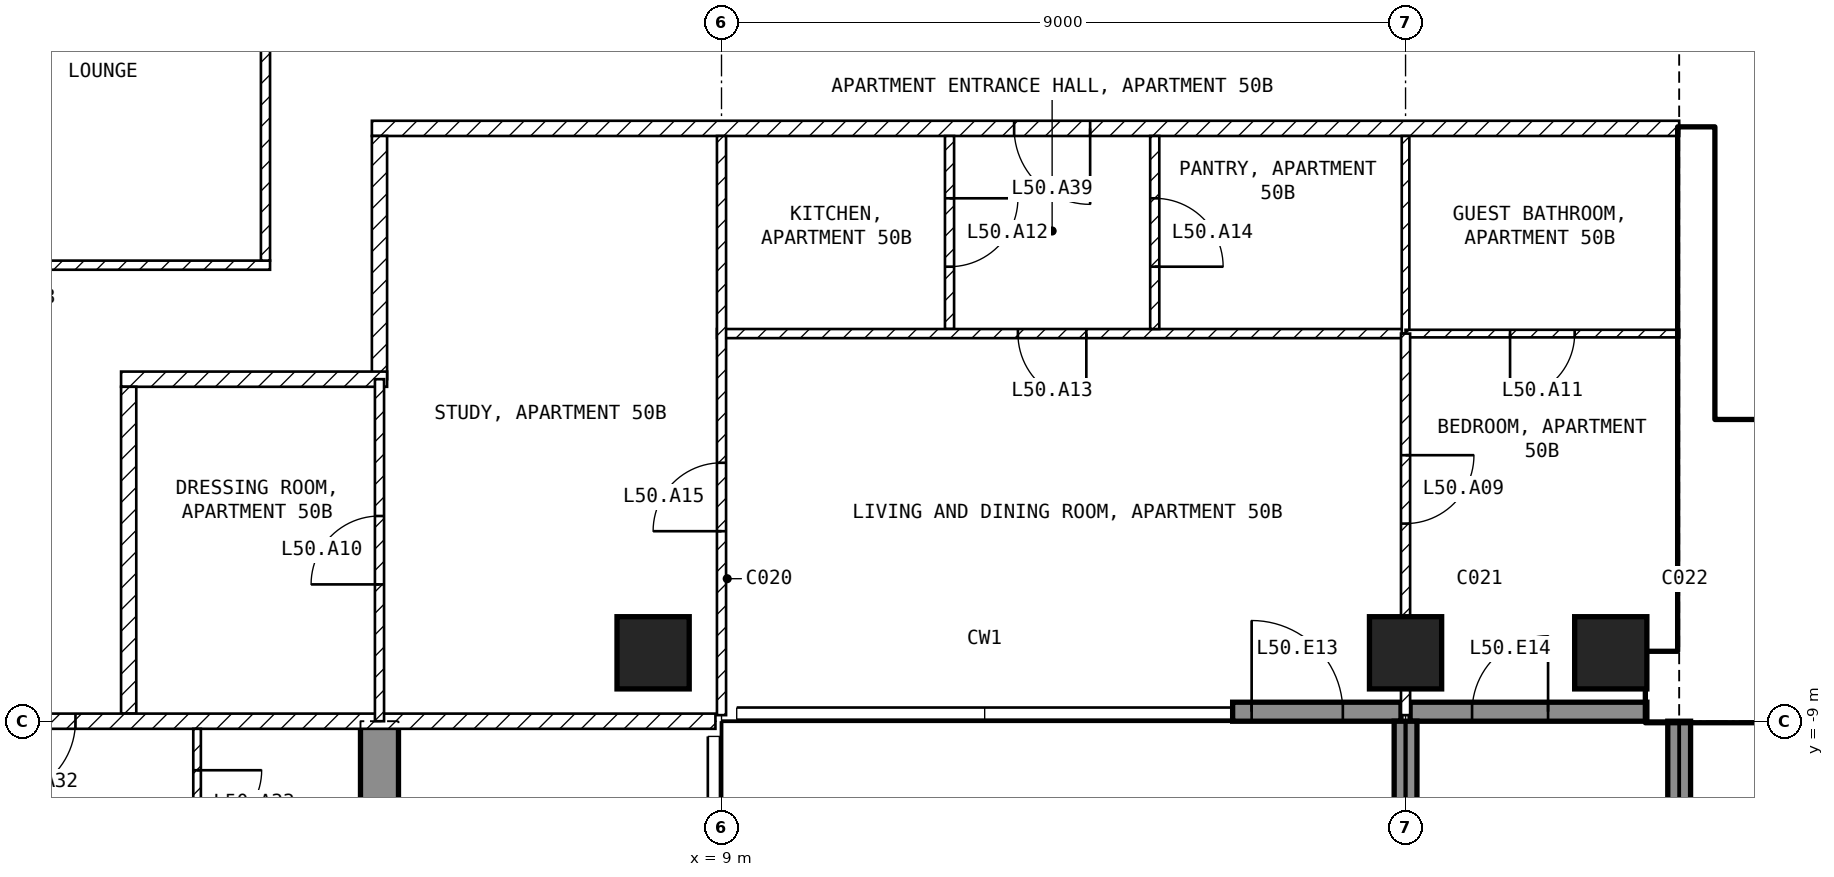
"""IFC4 building model, lengths in metres.
Left out: names, types, materials, properties, quantities, classifications, styles, units other than length and angle.
Written with IfcOpenShell. Run it as: python <this file> out.ifc"""

import sys

from ifc_helpers import new_model, si_unit, direction, frame, frame_2d, origin, origin_2d, place, context, subcontext, project, spatial, polyline, rectangle, outline, extrude, element, fill, save


model = new_model("IFC4")
c1 = context("Model", 3, precision=1e-05, world=origin(), true_north=direction((0.0, 1.0)))
c2 = subcontext(c1, "Body", "Model", "MODEL_VIEW")
j1 = project(units=[si_unit("LENGTHUNIT", "METRE"), si_unit("PLANEANGLEUNIT", "RADIAN")], contexts=[c1])
p1 = place(None, origin())
s1 = spatial("IfcSite", under=j1, at=p1, CompositionType="ELEMENT")
p2 = place(p1, origin())
s2 = spatial("IfcBuilding", under=s1, at=p2, CompositionType="ELEMENT")
p3 = place(p2, frame((0.0, 0.0, 201.6)))
s3 = spatial("IfcBuildingStorey", under=s2, at=p3, CompositionType="ELEMENT", Elevation=201.6)
for number, where, z_axis, x_axis in (
    (1, (8.1, -8.1, -0.25), (0.0, 0.0, 1.0), (1.0, 0.0, 0.0)),
    (2, (18.0, -8.1, -0.25), (0.0, 0.0, 1.0), (1.0, 0.0, 0.0)),
    (3, (20.7, -8.1, -0.25), (0.0, 0.0, 1.0), (1.0, 0.0, 0.0)),
):
    element("IfcColumn", number, at=place(p3, frame(where, z_axis=z_axis, x_axis=x_axis)), inside=s3, PredefinedType="COLUMN", context=c2, shape_type="SweptSolid", body=[
        extrude(rectangle(XDim=0.95, YDim=0.95, at=origin_2d()), origin(), (0.0, 0.0, 1.0), 3.5),
    ])
p4 = place(p3, frame((4.25, -20.225, -0.25), z_axis=(1.0, 0.0, 0.0), x_axis=(0.0, 1.0, 0.0)))
e4 = element("IfcWall", 4, at=p4, inside=s3, PredefinedType="SHEAR", context=c2, shape_type="SweptSolid", body=[
    extrude(outline(polyline([(0.0, 0.0), (6.725, 0.0), (6.725, 2.65), (9.125, 2.65), (9.125, 0.0), (11.225, 0.0), (11.225, 3.5), (0.0, 3.5), (0.0, 0.0)])), origin(), (0.0, 0.0, 1.0), 0.5),
])
p5 = place(p3, frame((15.725, -8.875, 0.0), z_axis=(0.0, 0.0, 1.0), x_axis=(1.0, 0.0, 0.0)))
e5 = element("IfcWall", 5, at=p5, inside=s3, PredefinedType="SOLIDWALL", context=c2, shape_type="SweptSolid", body=[
    extrude(rectangle(XDim=2.215, YDim=0.25, at=frame_2d((1.107, 0.0))), origin(), (0.0, 0.0, 1.0), 3.25),
])
p6 = place(p5, frame((0.25, 0.0, 0.0)))
e6 = element("IfcOpeningElement", 6, at=p6, cuts=e5, PredefinedType="OPENING", context=c2, shape_type="SweptSolid", body=[
    extrude(rectangle(XDim=1.2, YDim=2.4, at=frame_2d((0.6, 1.2))), frame((0.0, 0.135, 0.0), z_axis=(0.0, -1.0, 0.0), x_axis=(1.0, 0.0, 0.0)), (0.0, 0.0, 1.0), 0.27),
])
p7 = place(p3, frame((18.06, -8.875, 0.0), z_axis=(0.0, 0.0, 1.0), x_axis=(1.0, 0.0, 0.0)))
e7 = element("IfcWall", 7, at=p7, inside=s3, PredefinedType="SOLIDWALL", context=c2, shape_type="SweptSolid", body=[
    extrude(rectangle(XDim=3.115, YDim=0.25, at=frame_2d((1.558, 0.0))), origin(), (0.0, 0.0, 1.0), 3.25),
])
p8 = place(p7, frame((0.815, 0.0, 0.0)))
e8 = element("IfcOpeningElement", 8, at=p8, cuts=e7, PredefinedType="OPENING", context=c2, shape_type="SweptSolid", body=[
    extrude(rectangle(XDim=1.0, YDim=2.4, at=frame_2d((0.5, 1.2))), frame((0.0, 0.135, 0.0), z_axis=(0.0, -1.0, 0.0), x_axis=(1.0, 0.0, 0.0)), (0.0, 0.0, 1.0), 0.27),
])
for number, where, z_axis, x_axis in (
    (9, (18.0, -9.0, 0.0), (0.0, 0.0, 1.0), (0.0, -1.0, 0.0)),
    (10, (21.6, -9.0, 0.0), (0.0, 0.0, 1.0), (0.0, -1.0, 0.0)),
):
    element("IfcWall", number, at=place(p3, frame(where, z_axis=z_axis, x_axis=x_axis)), inside=s3, PredefinedType="SOLIDWALL", context=c2, shape_type="SweptSolid", body=[
        extrude(rectangle(XDim=2.7, YDim=0.3, at=frame_2d((1.35, 0.0))), origin(), (0.0, 0.0, 1.0), 3.25),
    ])
p9 = place(p3, frame((21.175, -8.55, 0.0), z_axis=(0.0, 0.0, 1.0), x_axis=(1.0, 0.0, 0.0)))
e11 = element("IfcWall", 11, at=p9, inside=s3, PredefinedType="SHEAR", context=c2, shape_type="SweptSolid", body=[
    extrude(rectangle(XDim=9.025, YDim=0.9, at=frame_2d((4.512, 0.0))), origin(), (0.0, 0.0, 1.0), 3.25),
])
p10 = place(p3, frame((21.825, -8.1, 0.0), z_axis=(0.0, 0.0, 1.0), x_axis=(0.0, 1.0, 0.0)))
e12 = element("IfcWall", 12, at=p10, inside=s3, PredefinedType="SHEAR", context=c2, shape_type="SweptSolid", body=[
    extrude(rectangle(XDim=6.9, YDim=0.45, at=frame_2d((3.45, 0.0))), origin(), (0.0, 0.0, 1.0), 3.25),
])
p11 = place(p3, frame((22.05, -5.15, 0.0), z_axis=(0.0, 0.0, 1.0), x_axis=(1.0, 0.0, 0.0)))
e13 = element("IfcWall", 13, at=p11, inside=s3, PredefinedType="SOLIDWALL", context=c2, shape_type="SweptSolid", body=[
    extrude(rectangle(XDim=6.3, YDim=0.2, at=frame_2d((3.15, 0.0))), origin(), (0.0, 0.0, 1.0), 3.25),
])
p12 = place(p11, frame((0.2, 0.0, 0.0)))
e14 = element("IfcOpeningElement", 14, at=p12, cuts=e13, PredefinedType="OPENING", context=c2, shape_type="SweptSolid", body=[
    extrude(rectangle(XDim=1.0, YDim=2.1, at=frame_2d((0.5, 1.05))), frame((0.0, 0.11, 0.0), z_axis=(0.0, -1.0, 0.0), x_axis=(1.0, 0.0, 0.0)), (0.0, 0.0, 1.0), 0.22),
])
p13 = place(p3, frame((-3.06, -3.0, 0.0), z_axis=(0.0, 0.0, 1.0), x_axis=(1.0, 0.0, 0.0)))
e15 = element("IfcWall", 15, at=p13, inside=s3, PredefinedType="PARTITIONING", context=c2, shape_type="SweptSolid", body=[
    extrude(rectangle(XDim=6.12, YDim=0.12, at=frame_2d((3.06, 0.0))), origin(), (0.0, 0.0, 1.0), 3.25),
])
p14 = place(p3, frame((3.0, -2.94, 0.0), z_axis=(0.0, 0.0, 1.0), x_axis=(0.0, 1.0, 0.0)))
e16 = element("IfcWall", 16, at=p14, inside=s3, PredefinedType="PARTITIONING", context=c2, shape_type="SweptSolid", body=[
    extrude(rectangle(XDim=5.88, YDim=0.12, at=frame_2d((2.94, 0.0))), origin(), (0.0, 0.0, 1.0), 3.25),
])
p15 = place(p3, frame((21.6, -1.2, 0.0), z_axis=(0.0, 0.0, 1.0), x_axis=(-1.0, 0.0, 0.0)))
e17 = element("IfcWall", 17, at=p15, inside=s3, PredefinedType="PARTITIONING", context=c2, shape_type="SweptSolid", body=[
    extrude(rectangle(XDim=17.2, YDim=0.2, at=frame_2d((8.6, 0.0))), origin(), (0.0, 0.0, 1.0), 3.25),
])
p16 = place(p15, frame((7.75, 0.0, 0.0)))
e18 = element("IfcOpeningElement", 18, at=p16, cuts=e17, PredefinedType="OPENING", context=c2, shape_type="SweptSolid", body=[
    extrude(rectangle(XDim=1.0, YDim=2.1, at=frame_2d((0.5, 1.05))), frame((0.0, 0.11, 0.0), z_axis=(0.0, -1.0, 0.0), x_axis=(1.0, 0.0, 0.0)), (0.0, 0.0, 1.0), 0.22),
])
p17 = place(p3, frame((4.5, -1.3, 0.0), z_axis=(0.0, 0.0, 1.0), x_axis=(0.0, -1.0, 0.0)))
e19 = element("IfcWall", 19, at=p17, inside=s3, PredefinedType="PARTITIONING", context=c2, shape_type="SweptSolid", body=[
    extrude(rectangle(XDim=3.2, YDim=0.2, at=frame_2d((1.6, 0.0))), origin(), (0.0, 0.0, 1.0), 3.25),
])
p18 = place(p3, frame((4.6, -4.5, 0.0), z_axis=(0.0, 0.0, 1.0), x_axis=(-1.0, 0.0, 0.0)))
e20 = element("IfcWall", 20, at=p18, inside=s3, PredefinedType="PARTITIONING", context=c2, shape_type="SweptSolid", body=[
    extrude(rectangle(XDim=3.5, YDim=0.2, at=frame_2d((1.75, 0.0))), origin(), (0.0, 0.0, 1.0), 3.25),
])
p19 = place(p3, frame((1.2, -4.6, 0.0), z_axis=(0.0, 0.0, 1.0), x_axis=(0.0, -1.0, 0.0)))
e21 = element("IfcWall", 21, at=p19, inside=s3, PredefinedType="PARTITIONING", context=c2, shape_type="SweptSolid", body=[
    extrude(rectangle(XDim=4.3, YDim=0.2, at=frame_2d((2.15, 0.0))), origin(), (0.0, 0.0, 1.0), 3.25),
])
p20 = place(p3, frame((8.92, -9.0, 0.0), z_axis=(0.0, 0.0, 1.0), x_axis=(-1.0, 0.0, 0.0)))
e22 = element("IfcWall", 22, at=p20, inside=s3, PredefinedType="PARTITIONING", context=c2, shape_type="SweptSolid", body=[
    extrude(rectangle(XDim=17.84, YDim=0.2, at=frame_2d((8.92, 0.0))), origin(), (0.0, 0.0, 1.0), 3.25),
])
p21 = place(p20, frame((8.42, 0.0, 0.0)))
e23 = element("IfcOpeningElement", 23, at=p21, cuts=e22, PredefinedType="OPENING", context=c2, shape_type="SweptSolid", body=[
    extrude(rectangle(XDim=1.0, YDim=2.1, at=frame_2d((0.5, 1.05))), frame((0.0, 0.11, 0.0), z_axis=(0.0, -1.0, 0.0), x_axis=(1.0, 0.0, 0.0)), (0.0, 0.0, 1.0), 0.22),
])
p22 = place(p3, frame((12.0, -1.3, 0.0), z_axis=(0.0, 0.0, 1.0), x_axis=(0.0, -1.0, 0.0)))
e24 = element("IfcWall", 24, at=p22, inside=s3, PredefinedType="PARTITIONING", context=c2, shape_type="SweptSolid", body=[
    extrude(rectangle(XDim=2.54, YDim=0.12, at=frame_2d((1.27, 0.0))), origin(), (0.0, 0.0, 1.0), 3.25),
])
p23 = place(p22, frame((0.82, 0.0, 0.0)))
e25 = element("IfcOpeningElement", 25, at=p23, cuts=e24, PredefinedType="OPENING", context=c2, shape_type="SweptSolid", body=[
    extrude(rectangle(XDim=0.9, YDim=2.1, at=frame_2d((0.45, 1.05))), frame((0.0, 0.07, 0.0), z_axis=(0.0, -1.0, 0.0), x_axis=(1.0, 0.0, 0.0)), (0.0, 0.0, 1.0), 0.14),
])
p24 = place(p3, frame((18.0, -3.9, 0.0), z_axis=(0.0, 0.0, 1.0), x_axis=(-1.0, 0.0, 0.0)))
e26 = element("IfcWall", 26, at=p24, inside=s3, PredefinedType="PARTITIONING", context=c2, shape_type="SweptSolid", body=[
    extrude(rectangle(XDim=9.06, YDim=0.12, at=frame_2d((4.53, 0.0))), origin(), (0.0, 0.0, 1.0), 3.25),
])
p25 = place(p24, frame((4.2, 0.0, 0.0)))
e27 = element("IfcOpeningElement", 27, at=p25, cuts=e26, PredefinedType="OPENING", context=c2, shape_type="SweptSolid", body=[
    extrude(rectangle(XDim=0.9, YDim=2.1, at=frame_2d((0.45, 1.05))), frame((0.0, 0.07, 0.0), z_axis=(0.0, -1.0, 0.0), x_axis=(1.0, 0.0, 0.0)), (0.0, 0.0, 1.0), 0.14),
])
p26 = place(p3, frame((9.0, -8.92, 0.0), z_axis=(0.0, 0.0, 1.0), x_axis=(0.0, 1.0, 0.0)))
e28 = element("IfcWall", 28, at=p26, inside=s3, PredefinedType="PARTITIONING", context=c2, shape_type="SweptSolid", body=[
    extrude(rectangle(XDim=7.62, YDim=0.12, at=frame_2d((3.81, 0.0))), origin(), (0.0, 0.0, 1.0), 3.25),
])
p27 = place(p26, frame((2.42, 0.0, 0.0)))
e29 = element("IfcOpeningElement", 29, at=p27, cuts=e28, PredefinedType="OPENING", context=c2, shape_type="SweptSolid", body=[
    extrude(rectangle(XDim=0.9, YDim=2.1, at=frame_2d((0.45, 1.05))), frame((0.0, 0.07, 0.0), z_axis=(0.0, -1.0, 0.0), x_axis=(1.0, 0.0, 0.0)), (0.0, 0.0, 1.0), 0.14),
])
p28 = place(p3, frame((14.7, -1.3, 0.0), z_axis=(0.0, 0.0, 1.0), x_axis=(0.0, -1.0, 0.0)))
e30 = element("IfcWall", 30, at=p28, inside=s3, PredefinedType="PARTITIONING", context=c2, shape_type="SweptSolid", body=[
    extrude(rectangle(XDim=2.54, YDim=0.12, at=frame_2d((1.27, 0.0))), origin(), (0.0, 0.0, 1.0), 3.25),
])
p29 = place(p28, frame((0.82, 0.0, 0.0)))
e31 = element("IfcOpeningElement", 31, at=p29, cuts=e30, PredefinedType="OPENING", context=c2, shape_type="SweptSolid", body=[
    extrude(rectangle(XDim=0.9, YDim=2.1, at=frame_2d((0.45, 1.05))), frame((0.0, 0.07, 0.0), z_axis=(0.0, -1.0, 0.0), x_axis=(1.0, 0.0, 0.0)), (0.0, 0.0, 1.0), 0.14),
])
p30 = place(p3, frame((18.0, -1.3, 0.0), z_axis=(0.0, 0.0, 1.0), x_axis=(0.0, -1.0, 0.0)))
e32 = element("IfcWall", 32, at=p30, inside=s3, PredefinedType="PARTITIONING", context=c2, shape_type="SweptSolid", body=[
    extrude(rectangle(XDim=2.6, YDim=0.1, at=frame_2d((1.3, 0.0))), origin(), (0.0, 0.0, 1.0), 2.48),
])
p31 = place(p3, frame((21.6, -3.9, 0.0), z_axis=(0.0, 0.0, 1.0), x_axis=(-1.0, 0.0, 0.0)))
e33 = element("IfcWall", 33, at=p31, inside=s3, PredefinedType="PARTITIONING", context=c2, shape_type="SweptSolid", body=[
    extrude(rectangle(XDim=3.6, YDim=0.1, at=frame_2d((1.8, 0.0))), origin(), (0.0, 0.0, 1.0), 3.25),
])
p32 = place(p31, frame((1.375, 0.0, 0.0)))
e34 = element("IfcOpeningElement", 34, at=p32, cuts=e33, PredefinedType="OPENING", context=c2, shape_type="SweptSolid", body=[
    extrude(rectangle(XDim=0.85, YDim=2.1, at=frame_2d((0.425, 1.05))), frame((0.0, 0.06, 0.0), z_axis=(0.0, -1.0, 0.0), x_axis=(1.0, 0.0, 0.0)), (0.0, 0.0, 1.0), 0.12),
])
p33 = place(p3, frame((18.0, -3.9, 0.0), z_axis=(0.0, 0.0, 1.0), x_axis=(0.0, -1.0, 0.0)))
e35 = element("IfcWall", 35, at=p33, inside=s3, PredefinedType="PARTITIONING", context=c2, shape_type="SweptSolid", body=[
    extrude(rectangle(XDim=5.02, YDim=0.12, at=frame_2d((2.51, 0.0))), origin(), (0.0, 0.0, 1.0), 2.48),
])
p34 = place(p33, frame((1.6, 0.0, 0.0)))
e36 = element("IfcOpeningElement", 36, at=p34, cuts=e35, PredefinedType="OPENING", context=c2, shape_type="SweptSolid", body=[
    extrude(rectangle(XDim=0.9, YDim=2.1, at=frame_2d((0.45, 1.05))), frame((0.0, 0.07, 0.0), z_axis=(0.0, -1.0, 0.0), x_axis=(1.0, 0.0, 0.0)), (0.0, 0.0, 1.0), 0.14),
])
p35 = place(p3, frame((4.5, -9.0, 0.0), z_axis=(0.0, 0.0, 1.0), x_axis=(0.0, 1.0, 0.0)))
e37 = element("IfcWall", 37, at=p35, inside=s3, PredefinedType="PARTITIONING", context=c2, shape_type="SweptSolid", body=[
    extrude(rectangle(XDim=4.5, YDim=0.12, at=frame_2d((2.25, 0.0))), origin(), (0.0, 0.0, 1.0), 3.25),
])
p36 = place(p35, frame((1.8, 0.0, 0.0)))
e38 = element("IfcOpeningElement", 38, at=p36, cuts=e37, PredefinedType="OPENING", context=c2, shape_type="SweptSolid", body=[
    extrude(rectangle(XDim=0.9, YDim=2.1, at=frame_2d((0.45, 1.05))), frame((0.0, 0.07, 0.0), z_axis=(0.0, -1.0, 0.0), x_axis=(1.0, 0.0, 0.0)), (0.0, 0.0, 1.0), 0.14),
])
p37 = place(p3, frame((2.1, -9.1, 0.0), z_axis=(0.0, 0.0, 1.0), x_axis=(0.0, -1.0, 0.0)))
e39 = element("IfcWall", 39, at=p37, inside=s3, PredefinedType="PARTITIONING", context=c2, shape_type="SweptSolid", body=[
    extrude(rectangle(XDim=1.94, YDim=0.1, at=frame_2d((0.97, 0.0))), origin(), (0.0, 0.0, 1.0), 3.25),
])
p38 = place(p37, frame((0.545, 0.0, 0.0)))
e40 = element("IfcOpeningElement", 40, at=p38, cuts=e39, PredefinedType="OPENING", context=c2, shape_type="SweptSolid", body=[
    extrude(rectangle(XDim=0.85, YDim=2.1, at=frame_2d((0.425, 1.05))), frame((0.0, 0.06, 0.0), z_axis=(0.0, -1.0, 0.0), x_axis=(1.0, 0.0, 0.0)), (0.0, 0.0, 1.0), 0.12),
])
p39 = place(p6, origin())
e41 = element("IfcDoor", 41, at=p39, inside=s3, OperationType="SINGLE_SWING_LEFT", PredefinedType="DOOR", context=c2, shape_type="SweptSolid", body=[
    extrude(rectangle(XDim=1.2, YDim=2.4, at=frame_2d((0.6, 1.2))), frame((0.0, 0.025, 0.0), z_axis=(0.0, -1.0, 0.0), x_axis=(1.0, 0.0, 0.0)), (0.0, 0.0, 1.0), 0.05),
])
fill(e6, e41)
p40 = place(p8, origin())
e42 = element("IfcDoor", 42, at=p40, inside=s3, OperationType="SINGLE_SWING_RIGHT", PredefinedType="DOOR", context=c2, shape_type="SweptSolid", body=[
    extrude(rectangle(XDim=1.0, YDim=2.4, at=frame_2d((0.5, 1.2))), frame((0.0, 0.025, 0.0), z_axis=(0.0, -1.0, 0.0), x_axis=(1.0, 0.0, 0.0)), (0.0, 0.0, 1.0), 0.05),
])
fill(e8, e42)
p41 = place(p12, origin())
e43 = element("IfcDoor", 43, at=p41, inside=s3, OperationType="SINGLE_SWING_LEFT", PredefinedType="DOOR", context=c2, shape_type="SweptSolid", body=[
    extrude(rectangle(XDim=1.0, YDim=2.1, at=frame_2d((0.5, 1.05))), frame((0.0, 0.025, 0.0), z_axis=(0.0, -1.0, 0.0), x_axis=(1.0, 0.0, 0.0)), (0.0, 0.0, 1.0), 0.05),
])
fill(e14, e43)
p42 = place(p34, origin())
e44 = element("IfcDoor", 44, at=p42, inside=s3, OperationType="SINGLE_SWING_LEFT", PredefinedType="DOOR", context=c2, shape_type="SweptSolid", body=[
    extrude(rectangle(XDim=0.9, YDim=2.1, at=frame_2d((0.45, 1.05))), frame((0.0, 0.025, 0.0), z_axis=(0.0, -1.0, 0.0), x_axis=(1.0, 0.0, 0.0)), (0.0, 0.0, 1.0), 0.05),
])
fill(e36, e44)
p43 = place(p36, origin())
e45 = element("IfcDoor", 45, at=p43, inside=s3, OperationType="SINGLE_SWING_LEFT", PredefinedType="DOOR", context=c2, shape_type="SweptSolid", body=[
    extrude(rectangle(XDim=0.9, YDim=2.1, at=frame_2d((0.45, 1.05))), frame((0.0, 0.025, 0.0), z_axis=(0.0, -1.0, 0.0), x_axis=(1.0, 0.0, 0.0)), (0.0, 0.0, 1.0), 0.05),
])
fill(e38, e45)
p44 = place(p32, origin())
e46 = element("IfcDoor", 46, at=p44, inside=s3, OperationType="SINGLE_SWING_RIGHT", PredefinedType="DOOR", context=c2, shape_type="SweptSolid", body=[
    extrude(rectangle(XDim=0.85, YDim=2.1, at=frame_2d((0.425, 1.05))), frame((0.0, 0.025, 0.0), z_axis=(0.0, -1.0, 0.0), x_axis=(1.0, 0.0, 0.0)), (0.0, 0.0, 1.0), 0.05),
])
fill(e34, e46)
p45 = place(p23, origin())
e47 = element("IfcDoor", 47, at=p45, inside=s3, OperationType="SINGLE_SWING_LEFT", PredefinedType="DOOR", context=c2, shape_type="SweptSolid", body=[
    extrude(rectangle(XDim=0.9, YDim=2.1, at=frame_2d((0.45, 1.05))), frame((0.0, 0.025, 0.0), z_axis=(0.0, -1.0, 0.0), x_axis=(1.0, 0.0, 0.0)), (0.0, 0.0, 1.0), 0.05),
])
fill(e25, e47)
p46 = place(p25, origin())
e48 = element("IfcDoor", 48, at=p46, inside=s3, OperationType="SINGLE_SWING_LEFT", PredefinedType="DOOR", context=c2, shape_type="SweptSolid", body=[
    extrude(rectangle(XDim=0.9, YDim=2.1, at=frame_2d((0.45, 1.05))), frame((0.0, 0.025, 0.0), z_axis=(0.0, -1.0, 0.0), x_axis=(1.0, 0.0, 0.0)), (0.0, 0.0, 1.0), 0.05),
])
fill(e27, e48)
p47 = place(p29, origin())
e49 = element("IfcDoor", 49, at=p47, inside=s3, OperationType="SINGLE_SWING_RIGHT", PredefinedType="DOOR", context=c2, shape_type="SweptSolid", body=[
    extrude(rectangle(XDim=0.9, YDim=2.1, at=frame_2d((0.45, 1.05))), frame((0.0, 0.025, 0.0), z_axis=(0.0, -1.0, 0.0), x_axis=(1.0, 0.0, 0.0)), (0.0, 0.0, 1.0), 0.05),
])
fill(e31, e49)
p48 = place(p27, origin())
e50 = element("IfcDoor", 50, at=p48, inside=s3, OperationType="SINGLE_SWING_LEFT", PredefinedType="DOOR", context=c2, shape_type="SweptSolid", body=[
    extrude(rectangle(XDim=0.9, YDim=2.1, at=frame_2d((0.45, 1.05))), frame((0.0, 0.025, 0.0), z_axis=(0.0, -1.0, 0.0), x_axis=(1.0, 0.0, 0.0)), (0.0, 0.0, 1.0), 0.05),
])
fill(e29, e50)
p49 = place(p21, origin())
e51 = element("IfcDoor", 51, at=p49, inside=s3, OperationType="SINGLE_SWING_RIGHT", PredefinedType="DOOR", context=c2, shape_type="SweptSolid", body=[
    extrude(rectangle(XDim=1.0, YDim=2.1, at=frame_2d((0.5, 1.05))), frame((0.0, 0.025, 0.0), z_axis=(0.0, -1.0, 0.0), x_axis=(1.0, 0.0, 0.0)), (0.0, 0.0, 1.0), 0.05),
])
fill(e23, e51)
p50 = place(p38, origin())
e52 = element("IfcDoor", 52, at=p50, inside=s3, OperationType="SINGLE_SWING_LEFT", PredefinedType="DOOR", context=c2, shape_type="SweptSolid", body=[
    extrude(rectangle(XDim=0.85, YDim=2.1, at=frame_2d((0.425, 1.05))), frame((0.0, 0.025, 0.0), z_axis=(0.0, -1.0, 0.0), x_axis=(1.0, 0.0, 0.0)), (0.0, 0.0, 1.0), 0.05),
])
fill(e40, e52)
p51 = place(p16, origin())
e53 = element("IfcDoor", 53, at=p51, inside=s3, OperationType="SINGLE_SWING_LEFT", PredefinedType="DOOR", context=c2, shape_type="SweptSolid", body=[
    extrude(rectangle(XDim=1.0, YDim=2.1, at=frame_2d((0.5, 1.05))), frame((0.0, 0.025, 0.0), z_axis=(0.0, -1.0, 0.0), x_axis=(1.0, 0.0, 0.0)), (0.0, 0.0, 1.0), 0.05),
])
fill(e18, e53)
save(model, sys.argv[1])
